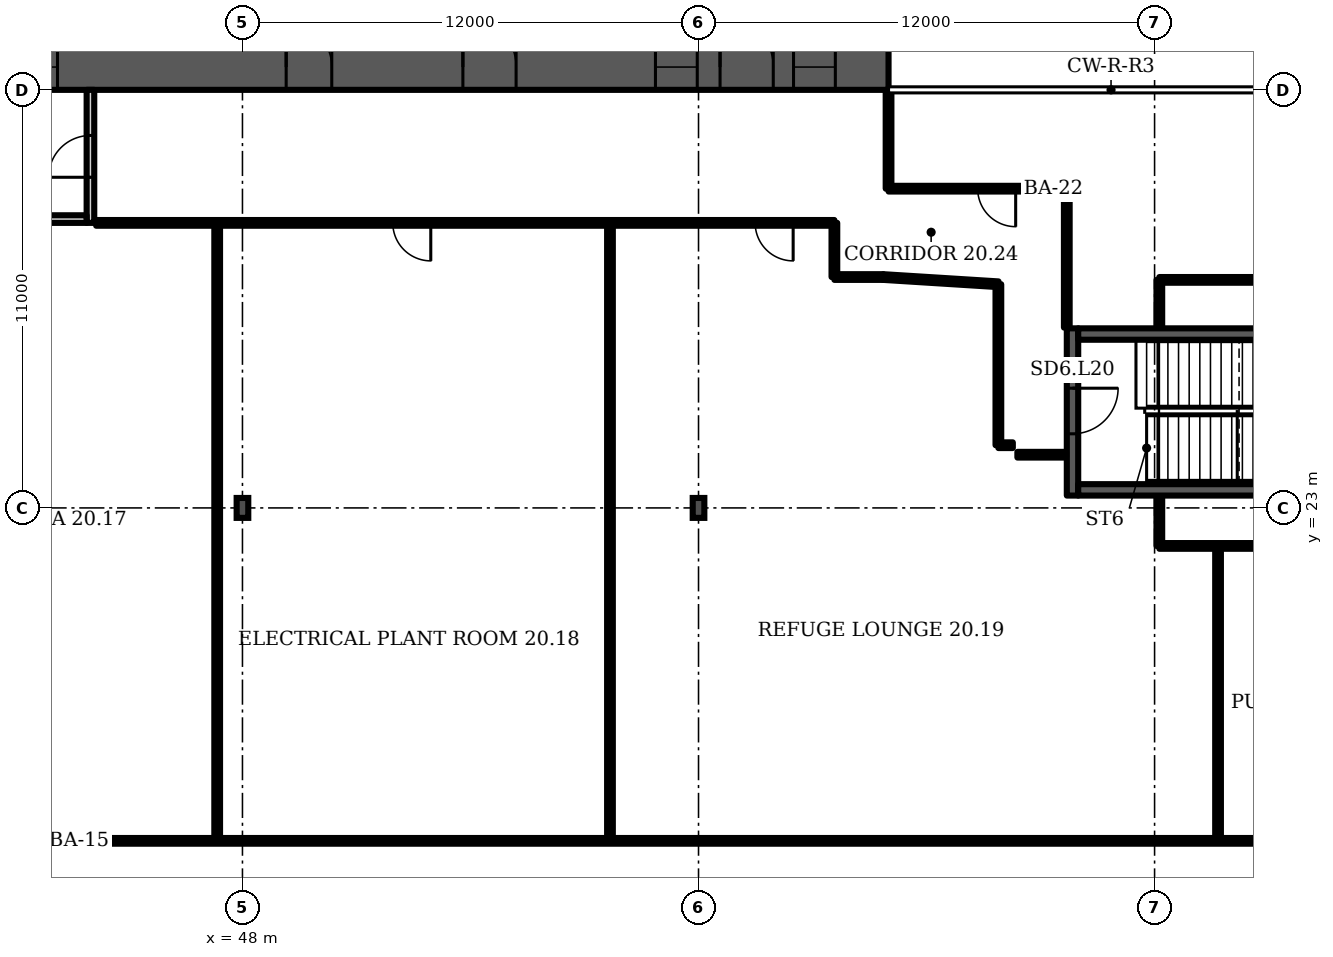
"""IFC4 building model, lengths in metres.
Left out: names, types, materials, properties, quantities, classifications, styles, units other than length and angle.
Written with IfcOpenShell. Run it as: python <this file> out.ifc"""

import sys

from ifc_helpers import new_model, si_unit, direction, frame, frame_2d, origin, origin_2d, place, context, subcontext, project, spatial, rectangle, i_section, extrude, element, fill, save


model = new_model("IFC4")
c1 = context("Model", 3, precision=1e-05, world=origin(), true_north=direction((0.0, 1.0)))
c2 = subcontext(c1, "Body", "Model", "MODEL_VIEW")
j1 = project(units=[si_unit("LENGTHUNIT", "METRE"), si_unit("PLANEANGLEUNIT", "RADIAN")], contexts=[c1])
p1 = place(None, origin())
s1 = spatial("IfcSite", under=j1, at=p1, CompositionType="ELEMENT")
p2 = place(p1, origin())
s2 = spatial("IfcBuilding", under=s1, at=p2, CompositionType="ELEMENT")
p3 = place(p2, frame((0.0, 0.0, 91.9)))
s3 = spatial("IfcBuildingStorey", under=s2, at=p3, CompositionType="ELEMENT", Elevation=91.9)
p4 = place(p3, frame((9.0, 34.6, 0.0), z_axis=(0.0, 0.0, 1.0), x_axis=(1.0, 0.0, 0.0)))
e1 = element("IfcWall", 1, at=p4, inside=s3, PredefinedType="SHEAR", context=c2, shape_type="SweptSolid", body=[
    extrude(rectangle(XDim=56.0, YDim=1.2, at=frame_2d((28.0, 0.0))), origin(), (0.0, 0.0, 1.0), 4.8),
])
p5 = place(p4, frame((3.3, 0.0, 0.0)))
e2 = element("IfcOpeningElement", 2, at=p5, cuts=e1, PredefinedType="OPENING", context=c2, shape_type="SweptSolid", body=[
    extrude(rectangle(XDim=1.0, YDim=2.1, at=frame_2d((0.5, 1.05))), frame((0.0, 0.61, 0.0), z_axis=(0.0, -1.0, 0.0), x_axis=(1.0, 0.0, 0.0)), (0.0, 0.0, 1.0), 1.22),
])
p6 = place(p4, frame((7.867, 0.0, 0.0)))
e3 = element("IfcOpeningElement", 3, at=p6, cuts=e1, PredefinedType="OPENING", context=c2, shape_type="SweptSolid", body=[
    extrude(rectangle(XDim=1.1, YDim=2.1, at=frame_2d((0.55, 1.05))), frame((0.0, 0.61, 0.0), z_axis=(0.0, -1.0, 0.0), x_axis=(1.0, 0.0, 0.0)), (0.0, 0.0, 1.0), 1.22),
])
p7 = place(p4, frame((12.033, 0.0, 0.0)))
e4 = element("IfcOpeningElement", 4, at=p7, cuts=e1, PredefinedType="OPENING", context=c2, shape_type="SweptSolid", body=[
    extrude(rectangle(XDim=1.1, YDim=2.1, at=frame_2d((0.55, 1.05))), frame((0.0, 0.61, 0.0), z_axis=(0.0, -1.0, 0.0), x_axis=(1.0, 0.0, 0.0)), (0.0, 0.0, 1.0), 1.22),
])
p8 = place(p4, frame((9.8, 0.0, 0.0)))
e5 = element("IfcOpeningElement", 5, at=p8, cuts=e1, PredefinedType="OPENING", context=c2, shape_type="SweptSolid", body=[
    extrude(rectangle(XDim=1.4, YDim=2.1, at=frame_2d((0.7, 1.05))), frame((0.0, 0.61, 0.0), z_axis=(0.0, -1.0, 0.0), x_axis=(1.0, 0.0, 0.0)), (0.0, 0.0, 1.0), 1.22),
])
p9 = place(p4, frame((14.65, 0.0, 0.0)))
e6 = element("IfcOpeningElement", 6, at=p9, cuts=e1, PredefinedType="OPENING", context=c2, shape_type="SweptSolid", body=[
    extrude(rectangle(XDim=1.2, YDim=2.1, at=frame_2d((0.6, 1.05))), frame((0.0, 0.61, 0.0), z_axis=(0.0, -1.0, 0.0), x_axis=(1.0, 0.0, 0.0)), (0.0, 0.0, 1.0), 1.22),
])
p10 = place(p4, frame((21.867, 0.0, 0.0)))
e7 = element("IfcOpeningElement", 7, at=p10, cuts=e1, PredefinedType="OPENING", context=c2, shape_type="SweptSolid", body=[
    extrude(rectangle(XDim=1.1, YDim=2.1, at=frame_2d((0.55, 1.05))), frame((0.0, 0.61, 0.0), z_axis=(0.0, -1.0, 0.0), x_axis=(1.0, 0.0, 0.0)), (0.0, 0.0, 1.0), 1.22),
])
p11 = place(p4, frame((26.033, 0.0, 0.0)))
e8 = element("IfcOpeningElement", 8, at=p11, cuts=e1, PredefinedType="OPENING", context=c2, shape_type="SweptSolid", body=[
    extrude(rectangle(XDim=1.1, YDim=2.1, at=frame_2d((0.55, 1.05))), frame((0.0, 0.61, 0.0), z_axis=(0.0, -1.0, 0.0), x_axis=(1.0, 0.0, 0.0)), (0.0, 0.0, 1.0), 1.22),
])
p12 = place(p4, frame((23.8, 0.0, 0.0)))
e9 = element("IfcOpeningElement", 9, at=p12, cuts=e1, PredefinedType="OPENING", context=c2, shape_type="SweptSolid", body=[
    extrude(rectangle(XDim=1.4, YDim=2.1, at=frame_2d((0.7, 1.05))), frame((0.0, 0.61, 0.0), z_axis=(0.0, -1.0, 0.0), x_axis=(1.0, 0.0, 0.0)), (0.0, 0.0, 1.0), 1.22),
])
p13 = place(p4, frame((28.867, 0.0, 0.0)))
e10 = element("IfcOpeningElement", 10, at=p13, cuts=e1, PredefinedType="OPENING", context=c2, shape_type="SweptSolid", body=[
    extrude(rectangle(XDim=1.1, YDim=2.1, at=frame_2d((0.55, 1.05))), frame((0.0, 0.61, 0.0), z_axis=(0.0, -1.0, 0.0), x_axis=(1.0, 0.0, 0.0)), (0.0, 0.0, 1.0), 1.22),
])
p14 = place(p4, frame((33.033, 0.0, 0.0)))
e11 = element("IfcOpeningElement", 11, at=p14, cuts=e1, PredefinedType="OPENING", context=c2, shape_type="SweptSolid", body=[
    extrude(rectangle(XDim=1.1, YDim=2.1, at=frame_2d((0.55, 1.05))), frame((0.0, 0.61, 0.0), z_axis=(0.0, -1.0, 0.0), x_axis=(1.0, 0.0, 0.0)), (0.0, 0.0, 1.0), 1.22),
])
p15 = place(p4, frame((40.15, 0.0, 0.0)))
e12 = element("IfcOpeningElement", 12, at=p15, cuts=e1, PredefinedType="OPENING", context=c2, shape_type="SweptSolid", body=[
    extrude(rectangle(XDim=1.2, YDim=2.1, at=frame_2d((0.6, 1.05))), frame((0.0, 0.61, 0.0), z_axis=(0.0, -1.0, 0.0), x_axis=(1.0, 0.0, 0.0)), (0.0, 0.0, 1.0), 1.22),
])
p16 = place(p4, frame((44.8, 0.0, 0.0)))
e13 = element("IfcOpeningElement", 13, at=p16, cuts=e1, PredefinedType="OPENING", context=c2, shape_type="SweptSolid", body=[
    extrude(rectangle(XDim=1.4, YDim=2.1, at=frame_2d((0.7, 1.05))), frame((0.0, 0.61, 0.0), z_axis=(0.0, -1.0, 0.0), x_axis=(1.0, 0.0, 0.0)), (0.0, 0.0, 1.0), 1.22),
])
p17 = place(p4, frame((49.867, 0.0, 0.0)))
e14 = element("IfcOpeningElement", 14, at=p17, cuts=e1, PredefinedType="OPENING", context=c2, shape_type="SweptSolid", body=[
    extrude(rectangle(XDim=1.1, YDim=2.1, at=frame_2d((0.55, 1.05))), frame((0.0, 0.61, 0.0), z_axis=(0.0, -1.0, 0.0), x_axis=(1.0, 0.0, 0.0)), (0.0, 0.0, 1.0), 1.22),
])
p18 = place(p4, frame((53.5, 0.0, 0.0)))
e15 = element("IfcOpeningElement", 15, at=p18, cuts=e1, PredefinedType="OPENING", context=c2, shape_type="SweptSolid", body=[
    extrude(rectangle(XDim=1.1, YDim=2.1, at=frame_2d((0.55, 1.05))), frame((0.0, 0.61, 0.0), z_axis=(0.0, -1.0, 0.0), x_axis=(1.0, 0.0, 0.0)), (0.0, 0.0, 1.0), 1.22),
])
p19 = place(p4, frame((51.567, 0.0, 0.0)))
e16 = element("IfcOpeningElement", 16, at=p19, cuts=e1, PredefinedType="OPENING", context=c2, shape_type="SweptSolid", body=[
    extrude(rectangle(XDim=1.4, YDim=2.1, at=frame_2d((0.7, 1.05))), frame((0.0, 0.61, 0.0), z_axis=(0.0, -1.0, 0.0), x_axis=(1.0, 0.0, 0.0)), (0.0, 0.0, 1.0), 1.22),
])
for number, where, z_axis, x_axis in (
    (17, (48.0, 23.0, 0.0), (0.0, 0.0, 1.0), (1.0, 0.0, 0.0)),
    (18, (60.0, 23.0, 0.0), (0.0, 0.0, 1.0), (1.0, 0.0, 0.0)),
):
    element("IfcColumn", number, at=place(p3, frame(where, z_axis=z_axis, x_axis=x_axis)), inside=s3, PredefinedType="COLUMN", context=c2, shape_type="SweptSolid", body=[
        extrude(i_section(OverallWidth=0.306, OverallDepth=0.524, WebThickness=0.021, FlangeThickness=0.04, FilletRadius=0.027, at=origin_2d()), origin(), (0.0, 0.0, 1.0), 4.8),
    ])
p20 = place(p3, frame((44.0, 30.5, 0.0), z_axis=(0.0, 0.0, 1.0), x_axis=(0.0, 1.0, 0.0)))
e19 = element("IfcWall", 19, at=p20, inside=s3, PredefinedType="PARTITIONING", context=c2, shape_type="SweptSolid", body=[
    extrude(rectangle(XDim=3.5, YDim=0.2, at=frame_2d((1.75, 0.0))), origin(), (0.0, 0.0, 1.0), 4.4),
])
p21 = place(p20, frame((1.2, 0.0, 0.0)))
e20 = element("IfcOpeningElement", 20, at=p21, cuts=e19, PredefinedType="OPENING", context=c2, shape_type="SweptSolid", body=[
    extrude(rectangle(XDim=1.1, YDim=2.1, at=frame_2d((0.55, 1.05))), frame((0.0, 0.11, 0.0), z_axis=(0.0, -1.0, 0.0), x_axis=(1.0, 0.0, 0.0)), (0.0, 0.0, 1.0), 0.22),
])
p22 = place(p3, frame((41.1, 30.6, 0.0), z_axis=(0.0, 0.0, 1.0), x_axis=(1.0, 0.0, 0.0)))
e21 = element("IfcWall", 21, at=p22, inside=s3, PredefinedType="PARTITIONING", context=c2, shape_type="SweptSolid", body=[
    extrude(rectangle(XDim=2.8, YDim=0.2, at=frame_2d((1.4, 0.0))), origin(), (0.0, 0.0, 1.0), 4.4),
])
p23 = place(p3, frame((69.84, 23.325, 0.0), z_axis=(0.0, 0.0, 1.0), x_axis=(0.0, 1.0, 0.0)))
e22 = element("IfcWall", 22, at=p23, inside=s3, PredefinedType="SHEAR", context=c2, shape_type="SweptSolid", body=[
    extrude(rectangle(XDim=4.4, YDim=0.3, at=frame_2d((2.2, 0.0))), origin(), (0.0, 0.0, 1.0), 4.4),
])
p24 = place(p23, frame((1.625, 0.0, 0.0)))
e23 = element("IfcOpeningElement", 23, at=p24, cuts=e22, PredefinedType="OPENING", context=c2, shape_type="SweptSolid", body=[
    extrude(rectangle(XDim=1.2, YDim=2.1, at=frame_2d((0.6, 1.05))), frame((0.0, 0.16, 0.0), z_axis=(0.0, -1.0, 0.0), x_axis=(1.0, 0.0, 0.0)), (0.0, 0.0, 1.0), 0.32),
])
p25 = place(p3, frame((18.2, 14.24, 0.0), z_axis=(0.0, 0.0, 1.0), x_axis=(1.0, 0.0, 0.0)))
e24 = element("IfcWall", 24, at=p25, inside=s3, PredefinedType="PARTITIONING", context=c2, shape_type="SweptSolid", body=[
    extrude(rectangle(XDim=67.735, YDim=0.15, at=frame_2d((33.868, 0.0))), origin(), (0.0, 0.0, 1.0), 4.4),
])
p26 = place(p25, frame((11.98, 0.0, 0.0)))
e25 = element("IfcOpeningElement", 25, at=p26, cuts=e24, PredefinedType="OPENING", context=c2, shape_type="SweptSolid", body=[
    extrude(rectangle(XDim=1.0, YDim=2.1, at=frame_2d((0.5, 1.05))), frame((0.0, 0.085, 0.0), z_axis=(0.0, -1.0, 0.0), x_axis=(1.0, 0.0, 0.0)), (0.0, 0.0, 1.0), 0.17),
])
p27 = place(p25, frame((23.515, 0.0, 0.0)))
e26 = element("IfcOpeningElement", 26, at=p27, cuts=e24, PredefinedType="OPENING", context=c2, shape_type="SweptSolid", body=[
    extrude(rectangle(XDim=1.0, YDim=2.1, at=frame_2d((0.5, 1.05))), frame((0.0, 0.085, 0.0), z_axis=(0.0, -1.0, 0.0), x_axis=(1.0, 0.0, 0.0)), (0.0, 0.0, 1.0), 0.17),
])
p28 = place(p25, frame((59.045, 0.0, 0.0)))
e27 = element("IfcOpeningElement", 27, at=p28, cuts=e24, PredefinedType="OPENING", context=c2, shape_type="SweptSolid", body=[
    extrude(rectangle(XDim=1.0, YDim=2.1, at=frame_2d((0.5, 1.05))), frame((0.0, 0.085, 0.0), z_axis=(0.0, -1.0, 0.0), x_axis=(1.0, 0.0, 0.0)), (0.0, 0.0, 1.0), 0.17),
])
p29 = place(p25, frame((65.035, 0.0, 0.0)))
e28 = element("IfcOpeningElement", 28, at=p29, cuts=e24, PredefinedType="OPENING", context=c2, shape_type="SweptSolid", body=[
    extrude(rectangle(XDim=1.0, YDim=2.1, at=frame_2d((0.5, 1.05))), frame((0.0, 0.085, 0.0), z_axis=(0.0, -1.0, 0.0), x_axis=(1.0, 0.0, 0.0)), (0.0, 0.0, 1.0), 0.17),
])
for number, where, z_axis, x_axis in (
    (29, (47.335, 14.24, 0.0), (0.0, 0.0, 1.0), (0.0, 1.0, 0.0)),
    (30, (57.67, 14.24, 0.0), (0.0, 0.0, 1.0), (0.0, 1.0, 0.0)),
):
    element("IfcWall", number, at=place(p3, frame(where, z_axis=z_axis, x_axis=x_axis)), inside=s3, PredefinedType="PARTITIONING", context=c2, shape_type="SweptSolid", body=[
        extrude(rectangle(XDim=16.26, YDim=0.15, at=frame_2d((8.13, 0.0))), origin(), (0.0, 0.0, 1.0), 4.4),
    ])
p30 = place(p3, frame((63.575, 29.075, 0.0), z_axis=(0.0, 0.0, 1.0), x_axis=(0.0, 1.0, 0.0)))
e31 = element("IfcWall", 31, at=p30, inside=s3, PredefinedType="PARTITIONING", context=c2, shape_type="SweptSolid", body=[
    extrude(rectangle(XDim=1.425, YDim=0.15, at=frame_2d((0.712, 0.0))), origin(), (0.0, 0.0, 1.0), 4.4),
])
p31 = place(p3, frame((63.575, 29.075, 0.0), z_axis=(0.0, 0.0, 1.0), x_axis=(1.0, 0.0, 0.0)))
e32 = element("IfcWall", 32, at=p31, inside=s3, PredefinedType="PARTITIONING", context=c2, shape_type="SweptSolid", body=[
    extrude(rectangle(XDim=1.285, YDim=0.15, at=frame_2d((0.643, 0.0))), origin(), (0.0, 0.0, 1.0), 4.4),
])
p32 = place(p3, frame((65.0, 31.4, 0.0), z_axis=(0.0, 0.0, 1.0), x_axis=(0.0, 1.0, 0.0)))
e33 = element("IfcWall", 33, at=p32, inside=s3, PredefinedType="PARTITIONING", context=c2, shape_type="SweptSolid", body=[
    extrude(rectangle(XDim=2.58, YDim=0.15, at=frame_2d((1.29, 0.0))), origin(), (0.0, 0.0, 1.0), 4.4),
])
p33 = place(p3, frame((65.0, 31.4, 0.0), z_axis=(0.0, 0.0, 1.0), x_axis=(1.0, 0.0, 0.0)))
e34 = element("IfcWall", 34, at=p33, inside=s3, PredefinedType="PARTITIONING", context=c2, shape_type="SweptSolid", body=[
    extrude(rectangle(XDim=4.69, YDim=0.15, at=frame_2d((2.345, 0.0))), origin(), (0.0, 0.0, 1.0), 4.4),
])
p34 = place(p33, frame((2.345, 0.0, 0.0)))
e35 = element("IfcOpeningElement", 35, at=p34, cuts=e34, PredefinedType="OPENING", context=c2, shape_type="SweptSolid", body=[
    extrude(rectangle(XDim=1.0, YDim=2.1, at=frame_2d((0.5, 1.05))), frame((0.0, 0.085, 0.0), z_axis=(0.0, -1.0, 0.0), x_axis=(1.0, 0.0, 0.0)), (0.0, 0.0, 1.0), 0.17),
])
p35 = place(p3, frame((67.89, 28.885, 0.0), z_axis=(0.0, 0.0, 1.0), x_axis=(-0.998045, 0.062569, 0.0)))
e36 = element("IfcWall", 36, at=p35, inside=s3, PredefinedType="PARTITIONING", context=c2, shape_type="SweptSolid", body=[
    extrude(rectangle(XDim=3.036, YDim=0.15, at=frame_2d((1.518, 0.0))), origin(), (0.0, 0.0, 1.0), 4.4),
])
p36 = place(p3, frame((67.89, 24.65, 0.0), z_axis=(0.0, 0.0, 1.0), x_axis=(0.0, 1.0, 0.0)))
e37 = element("IfcWall", 37, at=p36, inside=s3, PredefinedType="PARTITIONING", context=c2, shape_type="SweptSolid", body=[
    extrude(rectangle(XDim=4.235, YDim=0.15, at=frame_2d((2.118, 0.0))), origin(), (0.0, 0.0, 1.0), 4.4),
])
p37 = place(p3, frame((67.89, 24.65, 0.0), z_axis=(0.0, 0.0, 1.0), x_axis=(1.0, 0.0, 0.0)))
e38 = element("IfcWall", 38, at=p37, inside=s3, PredefinedType="PARTITIONING", context=c2, shape_type="SweptSolid", body=[
    extrude(rectangle(XDim=0.38, YDim=0.15, at=frame_2d((0.19, 0.0))), origin(), (0.0, 0.0, 1.0), 4.4),
])
p38 = place(p3, frame((68.39, 24.4, 0.0), z_axis=(0.0, 0.0, 1.0), x_axis=(1.0, 0.0, 0.0)))
e39 = element("IfcWall", 39, at=p38, inside=s3, PredefinedType="PARTITIONING", context=c2, shape_type="SweptSolid", body=[
    extrude(rectangle(XDim=1.281, YDim=0.15, at=frame_2d((0.64, 0.0))), origin(), (0.0, 0.0, 1.0), 4.4),
])
p39 = place(p3, frame((69.69, 27.745, 0.0), z_axis=(0.0, 0.0, 1.0), x_axis=(0.0, 1.0, 0.0)))
e40 = element("IfcWall", 40, at=p39, inside=s3, PredefinedType="PARTITIONING", context=c2, shape_type="SweptSolid", body=[
    extrude(rectangle(XDim=3.655, YDim=0.15, at=frame_2d((1.827, 0.0))), origin(), (0.0, 0.0, 1.0), 4.4),
])
p40 = place(p3, frame((72.125, 22.0, 0.0), z_axis=(0.0, 0.0, 1.0), x_axis=(0.0, 1.0, 0.0)))
e41 = element("IfcWall", 41, at=p40, inside=s3, PredefinedType="PARTITIONING", context=c2, shape_type="SweptSolid", body=[
    extrude(rectangle(XDim=1.305, YDim=0.15, at=frame_2d((0.652, 0.0))), origin(), (0.0, 0.0, 1.0), 4.4),
])
p41 = place(p3, frame((72.125, 22.0, 0.0), z_axis=(0.0, 0.0, 1.0), x_axis=(1.0, 0.0, 0.0)))
e42 = element("IfcWall", 42, at=p41, inside=s3, PredefinedType="PARTITIONING", context=c2, shape_type="SweptSolid", body=[
    extrude(rectangle(XDim=10.76, YDim=0.15, at=frame_2d((5.38, 0.0))), origin(), (0.0, 0.0, 1.0), 4.4),
])
p42 = place(p3, frame((72.125, 27.745, 0.0), z_axis=(0.0, 0.0, 1.0), x_axis=(0.0, 1.0, 0.0)))
e43 = element("IfcWall", 43, at=p42, inside=s3, PredefinedType="PARTITIONING", context=c2, shape_type="SweptSolid", body=[
    extrude(rectangle(XDim=1.255, YDim=0.15, at=frame_2d((0.627, 0.0))), origin(), (0.0, 0.0, 1.0), 4.4),
])
p43 = place(p3, frame((72.125, 29.0, 0.0), z_axis=(0.0, 0.0, 1.0), x_axis=(1.0, 0.0, 0.0)))
e44 = element("IfcWall", 44, at=p43, inside=s3, PredefinedType="PARTITIONING", context=c2, shape_type="SweptSolid", body=[
    extrude(rectangle(XDim=8.01, YDim=0.15, at=frame_2d((4.005, 0.0))), origin(), (0.0, 0.0, 1.0), 4.4),
])
p44 = place(p3, frame((73.67, 14.24, 0.0), z_axis=(0.0, 0.0, 1.0), x_axis=(0.0, 1.0, 0.0)))
e45 = element("IfcWall", 45, at=p44, inside=s3, PredefinedType="PARTITIONING", context=c2, shape_type="SweptSolid", body=[
    extrude(rectangle(XDim=7.76, YDim=0.15, at=frame_2d((3.88, 0.0))), origin(), (0.0, 0.0, 1.0), 4.4),
])
p45 = place(p3, frame((44.15, 30.5, 0.0), z_axis=(0.0, 0.0, 1.0), x_axis=(1.0, 0.0, 0.0)))
e46 = element("IfcWall", 46, at=p45, inside=s3, PredefinedType="PARTITIONING", context=c2, shape_type="SweptSolid", body=[
    extrude(rectangle(XDim=19.425, YDim=0.15, at=frame_2d((9.712, 0.0))), origin(), (0.0, 0.0, 1.0), 4.4),
])
p46 = place(p45, frame((7.805, 0.0, 0.0)))
e47 = element("IfcOpeningElement", 47, at=p46, cuts=e46, PredefinedType="OPENING", context=c2, shape_type="SweptSolid", body=[
    extrude(rectangle(XDim=1.0, YDim=2.1, at=frame_2d((0.5, 1.05))), frame((0.0, 0.085, 0.0), z_axis=(0.0, -1.0, 0.0), x_axis=(1.0, 0.0, 0.0)), (0.0, 0.0, 1.0), 0.17),
])
p47 = place(p45, frame((17.34, 0.0, 0.0)))
e48 = element("IfcOpeningElement", 48, at=p47, cuts=e46, PredefinedType="OPENING", context=c2, shape_type="SweptSolid", body=[
    extrude(rectangle(XDim=1.0, YDim=2.1, at=frame_2d((0.5, 1.05))), frame((0.0, 0.085, 0.0), z_axis=(0.0, -1.0, 0.0), x_axis=(1.0, 0.0, 0.0)), (0.0, 0.0, 1.0), 0.17),
])
for number, where, z_axis, x_axis in (
    (49, (69.99, 23.475, 0.0), (0.0, 0.0, 1.0), (1.0, 0.0, 0.0)),
    (50, (69.99, 27.575, 0.0), (0.0, 0.0, 1.0), (1.0, 0.0, 0.0)),
):
    element("IfcWall", number, at=place(p3, frame(where, z_axis=z_axis, x_axis=x_axis)), inside=s3, PredefinedType="SHEAR", context=c2, shape_type="SweptSolid", body=[
        extrude(rectangle(XDim=9.935, YDim=0.3, at=frame_2d((4.967, 0.0))), origin(), (0.0, 0.0, 1.0), 4.4),
    ])
p48 = place(p14, origin())
e51 = element("IfcDoor", 51, at=p48, inside=s3, OperationType="DOUBLE_DOOR_SLIDING", PredefinedType="DOOR", context=c2, shape_type="SweptSolid", body=[
    extrude(rectangle(XDim=1.1, YDim=2.1, at=frame_2d((0.55, 1.05))), frame((0.0, 0.025, 0.0), z_axis=(0.0, -1.0, 0.0), x_axis=(1.0, 0.0, 0.0)), (0.0, 0.0, 1.0), 0.05),
])
fill(e11, e51)
p49 = place(p15, origin())
e52 = element("IfcDoor", 52, at=p49, inside=s3, OperationType="SINGLE_SWING_LEFT", PredefinedType="DOOR", context=c2, shape_type="SweptSolid", body=[
    extrude(rectangle(XDim=1.2, YDim=2.1, at=frame_2d((0.6, 1.05))), frame((0.0, 0.025, 0.0), z_axis=(0.0, -1.0, 0.0), x_axis=(1.0, 0.0, 0.0)), (0.0, 0.0, 1.0), 0.05),
])
fill(e12, e52)
p50 = place(p16, origin())
e53 = element("IfcDoor", 53, at=p50, inside=s3, OperationType="DOUBLE_DOOR_SINGLE_SWING", PredefinedType="DOOR", context=c2, shape_type="SweptSolid", body=[
    extrude(rectangle(XDim=1.4, YDim=2.1, at=frame_2d((0.7, 1.05))), frame((0.0, 0.025, 0.0), z_axis=(0.0, -1.0, 0.0), x_axis=(1.0, 0.0, 0.0)), (0.0, 0.0, 1.0), 0.05),
])
fill(e13, e53)
p51 = place(p17, origin())
e54 = element("IfcDoor", 54, at=p51, inside=s3, OperationType="DOUBLE_DOOR_SLIDING", PredefinedType="DOOR", context=c2, shape_type="SweptSolid", body=[
    extrude(rectangle(XDim=1.1, YDim=2.1, at=frame_2d((0.55, 1.05))), frame((0.0, 0.025, 0.0), z_axis=(0.0, -1.0, 0.0), x_axis=(1.0, 0.0, 0.0)), (0.0, 0.0, 1.0), 0.05),
])
fill(e14, e54)
p52 = place(p18, origin())
e55 = element("IfcDoor", 55, at=p52, inside=s3, OperationType="DOUBLE_DOOR_SLIDING", PredefinedType="DOOR", context=c2, shape_type="SweptSolid", body=[
    extrude(rectangle(XDim=1.1, YDim=2.1, at=frame_2d((0.55, 1.05))), frame((0.0, 0.025, 0.0), z_axis=(0.0, -1.0, 0.0), x_axis=(1.0, 0.0, 0.0)), (0.0, 0.0, 1.0), 0.05),
])
fill(e15, e55)
p53 = place(p19, origin())
e56 = element("IfcDoor", 56, at=p53, inside=s3, OperationType="DOUBLE_DOOR_SINGLE_SWING", PredefinedType="DOOR", context=c2, shape_type="SweptSolid", body=[
    extrude(rectangle(XDim=1.4, YDim=2.1, at=frame_2d((0.7, 1.05))), frame((0.0, 0.025, 0.0), z_axis=(0.0, -1.0, 0.0), x_axis=(1.0, 0.0, 0.0)), (0.0, 0.0, 1.0), 0.05),
])
fill(e16, e56)
p54 = place(p21, origin())
e57 = element("IfcDoor", 57, at=p54, inside=s3, OperationType="SINGLE_SWING_LEFT", PredefinedType="DOOR", context=c2, shape_type="SweptSolid", body=[
    extrude(rectangle(XDim=1.1, YDim=2.1, at=frame_2d((0.55, 1.05))), frame((0.0, 0.025, 0.0), z_axis=(0.0, -1.0, 0.0), x_axis=(1.0, 0.0, 0.0)), (0.0, 0.0, 1.0), 0.05),
])
fill(e20, e57)
p55 = place(p24, origin())
e58 = element("IfcDoor", 58, at=p55, inside=s3, OperationType="SINGLE_SWING_RIGHT", PredefinedType="DOOR", context=c2, shape_type="SweptSolid", body=[
    extrude(rectangle(XDim=1.2, YDim=2.1, at=frame_2d((0.6, 1.05))), frame((0.0, 0.025, 0.0), z_axis=(0.0, -1.0, 0.0), x_axis=(1.0, 0.0, 0.0)), (0.0, 0.0, 1.0), 0.05),
])
fill(e23, e58)
p56 = place(p46, origin())
e59 = element("IfcDoor", 59, at=p56, inside=s3, OperationType="SINGLE_SWING_RIGHT", PredefinedType="DOOR", context=c2, shape_type="SweptSolid", body=[
    extrude(rectangle(XDim=1.0, YDim=2.1, at=frame_2d((0.5, 1.05))), frame((0.0, 0.025, 0.0), z_axis=(0.0, -1.0, 0.0), x_axis=(1.0, 0.0, 0.0)), (0.0, 0.0, 1.0), 0.05),
])
fill(e47, e59)
p57 = place(p47, origin())
e60 = element("IfcDoor", 60, at=p57, inside=s3, OperationType="SINGLE_SWING_RIGHT", PredefinedType="DOOR", context=c2, shape_type="SweptSolid", body=[
    extrude(rectangle(XDim=1.0, YDim=2.1, at=frame_2d((0.5, 1.05))), frame((0.0, 0.025, 0.0), z_axis=(0.0, -1.0, 0.0), x_axis=(1.0, 0.0, 0.0)), (0.0, 0.0, 1.0), 0.05),
])
fill(e48, e60)
p58 = place(p34, origin())
e61 = element("IfcDoor", 61, at=p58, inside=s3, OperationType="SINGLE_SWING_RIGHT", PredefinedType="DOOR", context=c2, shape_type="SweptSolid", body=[
    extrude(rectangle(XDim=1.0, YDim=2.1, at=frame_2d((0.5, 1.05))), frame((0.0, 0.025, 0.0), z_axis=(0.0, -1.0, 0.0), x_axis=(1.0, 0.0, 0.0)), (0.0, 0.0, 1.0), 0.05),
])
fill(e35, e61)
save(model, sys.argv[1])
